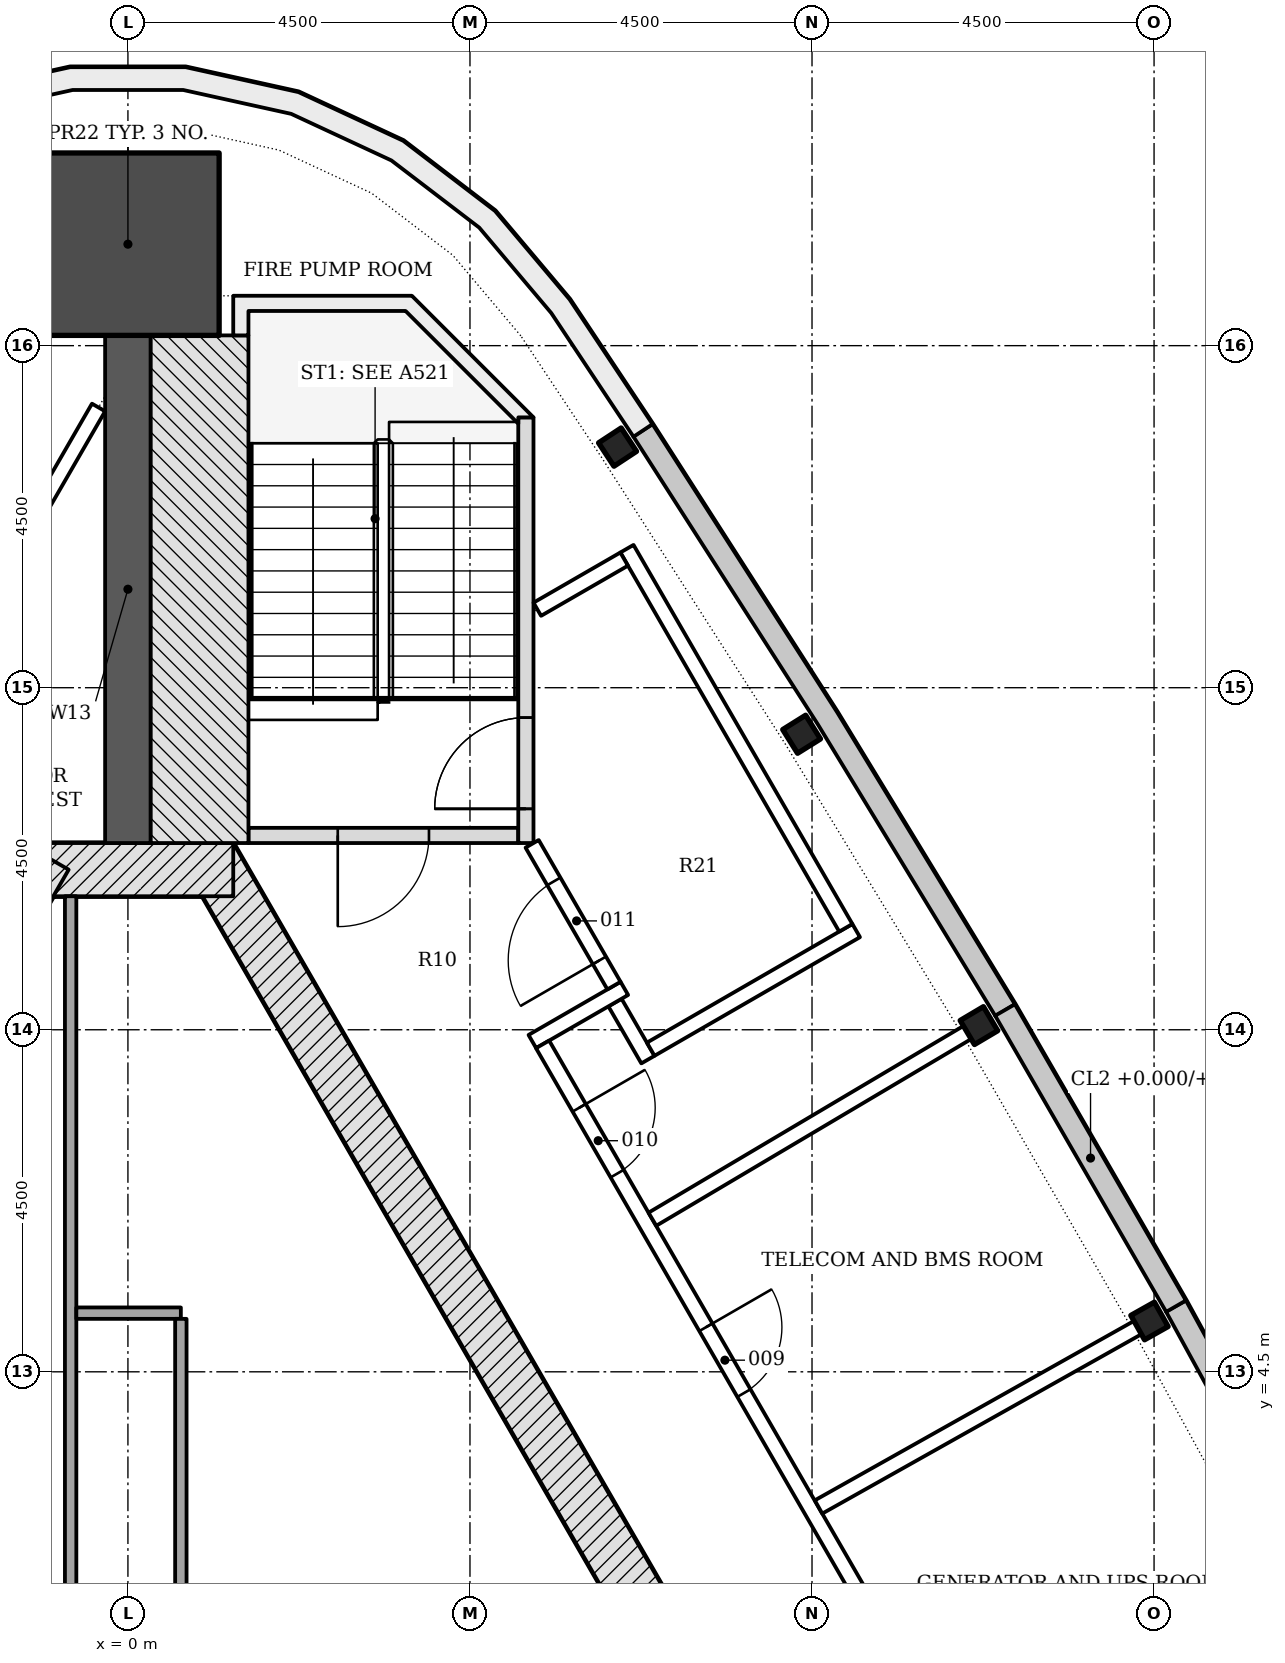
"""IFC4 building model, lengths in metres.
Left out: names, types, materials, properties, quantities, classifications, styles, units other than length and angle.
Written with IfcOpenShell. Run it as: python <this file> out.ifc"""

import sys

from ifc_helpers import new_model, si_unit, direction, frame, frame_2d, origin, origin_2d, place, context, subcontext, project, spatial, polyline, rectangle, i_section, outline, extrude, element, fill, save


model = new_model("IFC4")
c1 = context("Model", 3, precision=1e-05, world=origin(), true_north=direction((0.0, 1.0)))
c2 = subcontext(c1, "Body", "Model", "MODEL_VIEW")
j1 = project(units=[si_unit("LENGTHUNIT", "METRE"), si_unit("PLANEANGLEUNIT", "RADIAN")], contexts=[c1])
p1 = place(None, origin())
s1 = spatial("IfcSite", under=j1, at=p1, CompositionType="ELEMENT")
p2 = place(p1, origin())
s2 = spatial("IfcBuilding", under=s1, at=p2, CompositionType="ELEMENT")
p3 = place(p2, frame((0.0, 0.0, 302.1)))
s3 = spatial("IfcBuildingStorey", under=s2, at=p3, CompositionType="ELEMENT", Elevation=302.1)
p4 = place(p3, frame((10.311, -4.703, -0.25), z_axis=(0.0, 0.0, 1.0), x_axis=(-0.500001446645, 0.866024568562, 0.0)))
e1 = element("IfcWall", 1, at=p4, inside=s3, PredefinedType="SHEAR", context=c2, shape_type="SweptSolid", body=[
    extrude(rectangle(XDim=18.458, YDim=0.7, at=frame_2d((9.229, 0.0))), origin(), (0.0, 0.0, 1.0), 4.5),
])
p5 = place(p3, frame((1.386, 11.106, -0.25), z_axis=(0.0, 0.0, 1.0), x_axis=(-1.0, 0.0, 0.0)))
e2 = element("IfcWall", 2, at=p5, inside=s3, PredefinedType="SHEAR", context=c2, shape_type="SweptSolid", body=[
    extrude(rectangle(XDim=2.771, YDim=0.7, at=frame_2d((1.386, 0.0))), origin(), (0.0, 0.0, 1.0), 4.5),
])
p6 = place(p3, frame((-1.083, 11.281, -0.25), z_axis=(0.0, 0.0, 1.0), x_axis=(-0.500001446645, -0.866024568562, 0.0)))
e3 = element("IfcWall", 3, at=p6, inside=s3, PredefinedType="SHEAR", context=c2, shape_type="SweptSolid", body=[
    extrude(rectangle(XDim=18.458, YDim=0.7, at=frame_2d((9.229, 0.0))), origin(), (0.0, 0.0, 1.0), 4.5),
])
p7 = place(p6, frame((8.979, 0.0, 0.25)))
e4 = element("IfcOpeningElement", 4, at=p7, cuts=e3, PredefinedType="OPENING", context=c2, shape_type="SweptSolid", body=[
    extrude(rectangle(XDim=1.2, YDim=2.1, at=frame_2d((0.6, 1.05))), frame((0.0, 0.36, 0.0), z_axis=(0.0, -1.0, 0.0), x_axis=(1.0, 0.0, 0.0)), (0.0, 0.0, 1.0), 0.72),
])
p8 = place(p6, frame((11.029, 0.0, 0.25)))
e5 = element("IfcOpeningElement", 5, at=p8, cuts=e3, PredefinedType="OPENING", context=c2, shape_type="SweptSolid", body=[
    extrude(rectangle(XDim=1.2, YDim=2.1, at=frame_2d((0.6, 1.05))), frame((0.0, 0.36, 0.0), z_axis=(0.0, -1.0, 0.0), x_axis=(1.0, 0.0, 0.0)), (0.0, 0.0, 1.0), 0.72),
])
p9 = place(p3, frame((0.0, 11.456, -0.25), z_axis=(0.0, 0.0, 1.0), x_axis=(0.0, 1.0, 0.0)))
e6 = element("IfcWall", 6, at=p9, inside=s3, PredefinedType="SHEAR", context=c2, shape_type="SweptSolid", body=[
    extrude(rectangle(XDim=6.679, YDim=0.6, at=frame_2d((3.339, 0.0))), origin(), (0.0, 0.0, 1.0), 4.5),
])
p10 = place(p3, frame((0.0, 19.335, -0.25), z_axis=(0.0, 0.0, 1.0), x_axis=(0.0, 1.0, 0.0)))
e7 = element("IfcColumn", 7, at=p10, inside=s3, PredefinedType="COLUMN", context=c2, shape_type="SweptSolid", body=[
    extrude(rectangle(XDim=2.4, YDim=2.4, at=origin_2d()), origin(), (0.0, 0.0, 1.0), 4.5),
])
for number, where, z_axis, x_axis in (
    (8, (13.44, 5.169, -0.25), (0.0, 0.0, 1.0), (-0.49, 0.872, 0.0)),
    (9, (11.196, 9.055, -0.25), (0.0, 0.0, 1.0), (-0.51, 0.86, 0.0)),
    (10, (8.863, 12.888, -0.25), (0.0, 0.0, 1.0), (-0.53, 0.848, 0.0)),
    (11, (6.442, 16.666, -0.25), (0.0, 0.0, 1.0), (-0.549, 0.836, 0.0)),
):
    element("IfcColumn", number, at=place(p3, frame(where, z_axis=z_axis, x_axis=x_axis)), inside=s3, PredefinedType="COLUMN", context=c2, shape_type="SweptSolid", body=[
        extrude(i_section(OverallWidth=0.368, OverallDepth=0.356, WebThickness=0.011, FlangeThickness=0.018, FilletRadius=0.015, at=origin_2d()), origin(), (0.0, 0.0, 1.0), 4.5),
    ])
p11 = place(p3, origin())
e12 = element("IfcWall", 12, at=p11, inside=s3, PredefinedType="NOTDEFINED", context=c2, shape_type="SweptSolid", body=[
    extrude(outline(polyline([(18.145, -2.507), (16.078, 1.49), (13.919, 5.438), (13.656, 5.294), (15.813, 1.349), (17.878, -2.645), (18.145, -2.507)])), origin(), (0.0, 0.0, 1.0), 4.25),
])
p12 = place(p3, origin())
e13 = element("IfcWall", 13, at=p12, inside=s3, PredefinedType="NOTDEFINED", context=c2, shape_type="SweptSolid", body=[
    extrude(outline(polyline([(11.669, 9.335), (9.33, 13.179), (6.901, 16.968), (6.649, 16.806), (9.075, 13.02), (11.413, 9.179), (11.669, 9.335)])), origin(), (0.0, 0.0, 1.0), 4.25),
])
p13 = place(p3, origin())
e14 = element("IfcWall", 14, at=p13, inside=s3, PredefinedType="NOTDEFINED", context=c2, shape_type="SweptSolid", body=[
    extrude(outline(polyline([(13.919, 5.438), (11.669, 9.335), (11.409, 9.185), (13.659, 5.288), (13.919, 5.438)])), origin(), (0.0, 0.0, 1.0), 1.2),
])
p14 = place(p3, origin())
e15 = element("IfcWall", 15, at=p14, inside=s3, PredefinedType="NOTDEFINED", context=c2, shape_type="SweptSolid", body=[
    extrude(outline(polyline([(6.901, 16.968), (5.81, 18.61), (4.83, 19.771), (3.623, 20.695), (2.244, 21.335), (0.76, 21.664), (-0.76, 21.664), (-2.244, 21.335), (-3.623, 20.695), (-4.83, 19.771), (-5.81, 18.61), (-6.901, 16.968), (-6.651, 16.802), (-5.569, 18.429), (-4.622, 19.553), (-3.466, 20.437), (-2.147, 21.05), (-0.727, 21.364), (0.727, 21.364), (2.147, 21.05), (3.466, 20.437), (4.622, 19.553), (5.569, 18.429), (6.651, 16.802), (6.901, 16.968)])), origin(), (0.0, 0.0, 1.0), 4.25),
])
p15 = place(p3, frame((-0.754, 10.756, 0.0), z_axis=(0.0, 0.0, 1.0), x_axis=(0.0, -1.0, 0.0)))
e16 = element("IfcWall", 16, at=p15, inside=s3, PredefinedType="PARTITIONING", context=c2, shape_type="SweptSolid", body=[
    extrude(rectangle(XDim=16.985, YDim=0.15, at=frame_2d((8.492, 0.0))), origin(), (0.0, 0.0, 1.0), 4.25),
])
p16 = place(p15, frame((9.185, 0.0, 0.0)))
e17 = element("IfcOpeningElement", 17, at=p16, cuts=e16, PredefinedType="OPENING", context=c2, shape_type="SweptSolid", body=[
    extrude(rectangle(XDim=0.9, YDim=2.1, at=frame_2d((0.45, 1.05))), frame((0.0, 0.085, 0.0), z_axis=(0.0, -1.0, 0.0), x_axis=(1.0, 0.0, 0.0)), (0.0, 0.0, 1.0), 0.17),
])
p17 = place(p3, frame((-0.679, 5.272, 0.0), z_axis=(0.0, 0.0, 1.0), x_axis=(1.0, 0.0, 0.0)))
e18 = element("IfcWall", 18, at=p17, inside=s3, PredefinedType="PARTITIONING", context=c2, shape_type="SweptSolid", body=[
    extrude(rectangle(XDim=1.375, YDim=0.15, at=frame_2d((0.688, 0.0))), origin(), (0.0, 0.0, 1.0), 4.25),
])
p18 = place(p3, frame((0.696, 5.197, 0.0), z_axis=(0.0, 0.0, 1.0), x_axis=(0.0, -1.0, 0.0)))
e19 = element("IfcWall", 19, at=p18, inside=s3, PredefinedType="PARTITIONING", context=c2, shape_type="SweptSolid", body=[
    extrude(rectangle(XDim=11.425, YDim=0.15, at=frame_2d((5.712, 0.0))), origin(), (0.0, 0.0, 1.0), 4.25),
])
p19 = place(p18, frame((3.664, 0.0, 0.0)))
e20 = element("IfcOpeningElement", 20, at=p19, cuts=e19, PredefinedType="OPENING", context=c2, shape_type="SweptSolid", body=[
    extrude(rectangle(XDim=0.9, YDim=2.1, at=frame_2d((0.45, 1.05))), frame((0.0, 0.085, 0.0), z_axis=(0.0, -1.0, 0.0), x_axis=(1.0, 0.0, 0.0)), (0.0, 0.0, 1.0), 0.17),
])
p20 = place(p3, frame((5.135, 11.556, -0.25), z_axis=(0.0, 0.0, 1.0), x_axis=(-1.0, 0.0, 0.0)))
e21 = element("IfcWall", 21, at=p20, inside=s3, PredefinedType="SHEAR", context=c2, shape_type="SweptSolid", body=[
    extrude(rectangle(XDim=3.55, YDim=0.2, at=frame_2d((1.775, 0.0))), origin(), (0.0, 0.0, 1.0), 4.5),
])
p21 = place(p20, frame((1.175, 0.0, 0.25)))
e22 = element("IfcOpeningElement", 22, at=p21, cuts=e21, PredefinedType="OPENING", context=c2, shape_type="SweptSolid", body=[
    extrude(rectangle(XDim=1.2, YDim=2.1, at=frame_2d((0.6, 1.05))), frame((0.0, 0.11, 0.0), z_axis=(0.0, -1.0, 0.0), x_axis=(1.0, 0.0, 0.0)), (0.0, 0.0, 1.0), 0.22),
])
p22 = place(p3, frame((5.236, 11.456, -0.25), z_axis=(0.0, 0.0, 1.0), x_axis=(0.0, 1.0, 0.0)))
e23 = element("IfcWall", 23, at=p22, inside=s3, PredefinedType="SHEAR", context=c2, shape_type="SweptSolid", body=[
    extrude(rectangle(XDim=5.6, YDim=0.2, at=frame_2d((2.8, 0.0))), origin(), (0.0, 0.0, 1.0), 4.5),
])
p23 = place(p22, frame((0.45, 0.0, 0.25)))
e24 = element("IfcOpeningElement", 24, at=p23, cuts=e23, PredefinedType="OPENING", context=c2, shape_type="SweptSolid", body=[
    extrude(rectangle(XDim=1.2, YDim=2.1, at=frame_2d((0.6, 1.05))), frame((0.0, 0.11, 0.0), z_axis=(0.0, -1.0, 0.0), x_axis=(1.0, 0.0, 0.0)), (0.0, 0.0, 1.0), 0.22),
])
p24 = place(p3, frame((0.943, 11.456, -0.25), z_axis=(0.0, 0.0, 1.0), x_axis=(0.0, 1.0, 0.0)))
e25 = element("IfcWall", 25, at=p24, inside=s3, PredefinedType="SHEAR", context=c2, shape_type="SweptSolid", body=[
    extrude(rectangle(XDim=6.679, YDim=1.286, at=frame_2d((3.339, 0.0))), origin(), (0.0, 0.0, 1.0), 4.5),
])
p25 = place(p3, frame((0.0, 0.0, -0.25)))
e26 = element("IfcWall", 26, at=p25, inside=s3, PredefinedType="SHEAR", context=c2, shape_type="SweptSolid", body=[
    extrude(outline(polyline([(5.336, 17.056), (3.736, 18.656), (1.385, 18.656), (1.385, 18.135), (1.586, 18.135), (1.586, 18.456), (3.653, 18.456), (5.135, 16.974), (5.135, 17.056), (5.135, 17.056), (5.135, 17.056), (5.135, 17.056), (5.135, 17.056), (5.135, 17.056), (5.135, 17.056), (5.135, 17.056), (5.135, 17.056), (5.135, 17.056), (5.135, 17.056), (5.135, 17.056), (5.135, 17.056), (5.135, 17.056), (5.135, 17.056), (5.135, 17.056), (5.135, 17.056), (5.336, 17.056)])), origin(), (0.0, 0.0, 1.0), 4.5),
])
p26 = place(p3, frame((-7.307, 5.2, 0.0), z_axis=(0.0, 0.0, 1.0), x_axis=(0.49999780173, 0.866026672953, 0.0)))
e27 = element("IfcWall", 27, at=p26, inside=s3, PredefinedType="PARTITIONING", context=c2, shape_type="SweptSolid", body=[
    extrude(rectangle(XDim=13.841, YDim=0.2, at=frame_2d((6.92, 0.0))), origin(), (0.0, 0.0, 1.0), 3.702),
])
p27 = place(p26, frame((9.457, 0.0, 0.0)))
e28 = element("IfcOpeningElement", 28, at=p27, cuts=e27, PredefinedType="OPENING", context=c2, shape_type="SweptSolid", body=[
    extrude(rectangle(XDim=1.0, YDim=2.1, at=frame_2d((0.5, 1.05))), frame((0.0, 0.11, 0.0), z_axis=(0.0, -1.0, 0.0), x_axis=(1.0, 0.0, 0.0)), (0.0, 0.0, 1.0), 0.22),
])
p28 = place(p26, frame((2.299, 0.0, 0.0)))
e29 = element("IfcOpeningElement", 29, at=p28, cuts=e27, PredefinedType="OPENING", context=c2, shape_type="SweptSolid", body=[
    extrude(rectangle(XDim=1.0, YDim=2.1, at=frame_2d((0.5, 1.05))), frame((0.0, 0.11, 0.0), z_axis=(0.0, -1.0, 0.0), x_axis=(1.0, 0.0, 0.0)), (0.0, 0.0, 1.0), 0.22),
])
p29 = place(p3, frame((6.408, 9.358, 0.0), z_axis=(0.0, 0.0, 1.0), x_axis=(0.499958279983, -0.866049489508, 0.0)))
e30 = element("IfcWall", 30, at=p29, inside=s3, PredefinedType="PARTITIONING", context=c2, shape_type="SweptSolid", body=[
    extrude(rectangle(XDim=0.866, YDim=0.2, at=frame_2d((0.433, 0.0))), origin(), (0.0, 0.0, 1.0), 4.25),
])
p30 = place(p3, frame((5.32, 8.845, 0.0), z_axis=(0.0, 0.0, 1.0), x_axis=(0.866031452229, 0.49998952364, 0.0)))
e31 = element("IfcWall", 31, at=p30, inside=s3, PredefinedType="PARTITIONING", context=c2, shape_type="SweptSolid", body=[
    extrude(rectangle(XDim=1.398, YDim=0.2, at=frame_2d((0.699, 0.0))), origin(), (0.0, 0.0, 1.0), 4.25),
])
p31 = place(p3, frame((6.395, 9.581, 0.0), z_axis=(0.0, 0.0, 1.0), x_axis=(-0.500003735859, 0.866023246874, 0.0)))
e32 = element("IfcWall", 32, at=p31, inside=s3, PredefinedType="PARTITIONING", context=c2, shape_type="SweptSolid", body=[
    extrude(rectangle(XDim=2.154, YDim=0.2, at=frame_2d((1.077, 0.0))), origin(), (0.0, 0.0, 1.0), 3.702),
])
p32 = place(p31, frame((0.383, 0.0, 0.0)))
e33 = element("IfcOpeningElement", 33, at=p32, cuts=e32, PredefinedType="OPENING", context=c2, shape_type="SweptSolid", body=[
    extrude(rectangle(XDim=1.2, YDim=2.1, at=frame_2d((0.6, 1.05))), frame((0.0, 0.11, 0.0), z_axis=(0.0, -1.0, 0.0), x_axis=(1.0, 0.0, 0.0)), (0.0, 0.0, 1.0), 0.22),
])
p33 = place(p3, frame((5.455, 8.808, 0.0), z_axis=(0.0, 0.0, 1.0), x_axis=(0.499996641012, -0.866027343088, 0.0)))
e34 = element("IfcWall", 34, at=p33, inside=s3, PredefinedType="PARTITIONING", context=c2, shape_type="SweptSolid", body=[
    extrude(rectangle(XDim=19.937, YDim=0.2, at=frame_2d((9.969, 0.0))), origin(), (0.0, 0.0, 1.0), 3.702),
])
p34 = place(p33, frame((13.097, 0.0, 0.0)))
e35 = element("IfcOpeningElement", 35, at=p34, cuts=e34, PredefinedType="OPENING", context=c2, shape_type="SweptSolid", body=[
    extrude(rectangle(XDim=1.0, YDim=2.1, at=frame_2d((0.5, 1.05))), frame((0.0, 0.11, 0.0), z_axis=(0.0, -1.0, 0.0), x_axis=(1.0, 0.0, 0.0)), (0.0, 0.0, 1.0), 0.22),
])
p35 = place(p33, frame((4.297, 0.0, 0.0)))
e36 = element("IfcOpeningElement", 36, at=p35, cuts=e34, PredefinedType="OPENING", context=c2, shape_type="SweptSolid", body=[
    extrude(rectangle(XDim=1.0, YDim=2.1, at=frame_2d((0.5, 1.05))), frame((0.0, 0.11, 0.0), z_axis=(0.0, -1.0, 0.0), x_axis=(1.0, 0.0, 0.0)), (0.0, 0.0, 1.0), 0.22),
])
p36 = place(p33, frame((0.963, 0.0, 0.0)))
e37 = element("IfcOpeningElement", 37, at=p36, cuts=e34, PredefinedType="OPENING", context=c2, shape_type="SweptSolid", body=[
    extrude(rectangle(XDim=1.0, YDim=2.1, at=frame_2d((0.5, 1.05))), frame((0.0, 0.11, 0.0), z_axis=(0.0, -1.0, 0.0), x_axis=(1.0, 0.0, 0.0)), (0.0, 0.0, 1.0), 0.22),
])
p37 = place(p3, frame((9.086, 2.722, 0.0), z_axis=(0.0, 0.0, 1.0), x_axis=(0.87175044705, 0.489950158759, 0.0)))
e38 = element("IfcWall", 38, at=p37, inside=s3, PredefinedType="PARTITIONING", context=c2, shape_type="SweptSolid", body=[
    extrude(rectangle(XDim=4.844, YDim=0.2, at=frame_2d((2.422, 0.0))), origin(), (0.0, 0.0, 1.0), 3.702),
])
p38 = place(p3, frame((6.9, 6.508, 0.0), z_axis=(0.0, 0.0, 1.0), x_axis=(0.860180185222, 0.509990243977, 0.0)))
e39 = element("IfcWall", 39, at=p38, inside=s3, PredefinedType="PARTITIONING", context=c2, shape_type="SweptSolid", body=[
    extrude(rectangle(XDim=4.845, YDim=0.2, at=frame_2d((2.422, 0.0))), origin(), (0.0, 0.0, 1.0), 3.702),
])
p39 = place(p3, frame((6.878, 8.744, 0.0), z_axis=(0.0, 0.0, 1.0), x_axis=(0.866025387892, 0.500000027526, 0.0)))
e40 = element("IfcWall", 40, at=p39, inside=s3, PredefinedType="PARTITIONING", context=c2, shape_type="SweptSolid", body=[
    extrude(rectangle(XDim=3.122, YDim=0.2, at=frame_2d((1.561, 0.0))), origin(), (0.0, 0.0, 1.0), 4.25),
])
p40 = place(p3, frame((9.445, 10.341, 0.0), z_axis=(0.0, 0.0, 1.0), x_axis=(-0.499996461177, 0.866027446915, 0.0)))
e41 = element("IfcWall", 41, at=p40, inside=s3, PredefinedType="PARTITIONING", context=c2, shape_type="SweptSolid", body=[
    extrude(rectangle(XDim=5.759, YDim=0.2, at=frame_2d((2.879, 0.0))), origin(), (0.0, 0.0, 1.0), 3.702),
])
p41 = place(p3, frame((6.529, 15.192, 0.0), z_axis=(0.0, 0.0, 1.0), x_axis=(-0.866117824122, -0.499839889103, 0.0)))
e42 = element("IfcWall", 42, at=p41, inside=s3, PredefinedType="PARTITIONING", context=c2, shape_type="SweptSolid", body=[
    extrude(rectangle(XDim=1.32, YDim=0.2, at=frame_2d((0.66, 0.0))), origin(), (0.0, 0.0, 1.0), 4.25),
])
p42 = place(p21, origin())
e43 = element("IfcDoor", 43, at=p42, inside=s3, OperationType="SINGLE_SWING_RIGHT", PredefinedType="DOOR", context=c2, shape_type="SweptSolid", body=[
    extrude(rectangle(XDim=1.2, YDim=2.1, at=frame_2d((0.6, 1.05))), frame((0.0, 0.025, 0.0), z_axis=(0.0, -1.0, 0.0), x_axis=(1.0, 0.0, 0.0)), (0.0, 0.0, 1.0), 0.05),
])
fill(e22, e43)
p43 = place(p23, origin())
e44 = element("IfcDoor", 44, at=p43, inside=s3, OperationType="SINGLE_SWING_LEFT", PredefinedType="DOOR", context=c2, shape_type="SweptSolid", body=[
    extrude(rectangle(XDim=1.2, YDim=2.1, at=frame_2d((0.6, 1.05))), frame((0.0, 0.025, 0.0), z_axis=(0.0, -1.0, 0.0), x_axis=(1.0, 0.0, 0.0)), (0.0, 0.0, 1.0), 0.05),
])
fill(e24, e44)
p44 = place(p2, frame((0.0, 0.0, 306.6)))
p45 = place(p44, frame((5.236, 11.456, -0.25), z_axis=(0.0, 0.0, 1.0), x_axis=(0.0, 1.0, 0.0)))
p46 = place(p45, frame((0.45, 0.0, 0.25)))
p47 = place(p46, origin())
e45 = element("IfcDoor", 45, at=p47, inside=s3, OperationType="SINGLE_SWING_LEFT", PredefinedType="DOOR", context=c2, shape_type="SweptSolid", body=[
    extrude(rectangle(XDim=1.2, YDim=2.1, at=frame_2d((0.6, 1.05))), frame((0.0, 0.025, 0.0), z_axis=(0.0, -1.0, 0.0), x_axis=(1.0, 0.0, 0.0)), (0.0, 0.0, 1.0), 0.05),
])
p48 = place(p35, origin())
e46 = element("IfcDoor", 46, at=p48, inside=s3, OperationType="SINGLE_SWING_LEFT", PredefinedType="DOOR", context=c2, shape_type="SweptSolid", body=[
    extrude(rectangle(XDim=1.0, YDim=2.1, at=frame_2d((0.5, 1.05))), frame((0.0, 0.025, 0.0), z_axis=(0.0, -1.0, 0.0), x_axis=(1.0, 0.0, 0.0)), (0.0, 0.0, 1.0), 0.05),
])
fill(e36, e46)
p49 = place(p36, origin())
e47 = element("IfcDoor", 47, at=p49, inside=s3, OperationType="SINGLE_SWING_LEFT", PredefinedType="DOOR", context=c2, shape_type="SweptSolid", body=[
    extrude(rectangle(XDim=1.0, YDim=2.1, at=frame_2d((0.5, 1.05))), frame((0.0, 0.025, 0.0), z_axis=(0.0, -1.0, 0.0), x_axis=(1.0, 0.0, 0.0)), (0.0, 0.0, 1.0), 0.05),
])
fill(e37, e47)
p50 = place(p32, origin())
e48 = element("IfcDoor", 48, at=p50, inside=s3, OperationType="SINGLE_SWING_LEFT", PredefinedType="DOOR", context=c2, shape_type="SweptSolid", body=[
    extrude(rectangle(XDim=1.2, YDim=2.1, at=frame_2d((0.6, 1.05))), frame((0.0, 0.025, 0.0), z_axis=(0.0, -1.0, 0.0), x_axis=(1.0, 0.0, 0.0)), (0.0, 0.0, 1.0), 0.05),
])
fill(e33, e48)
save(model, sys.argv[1])
